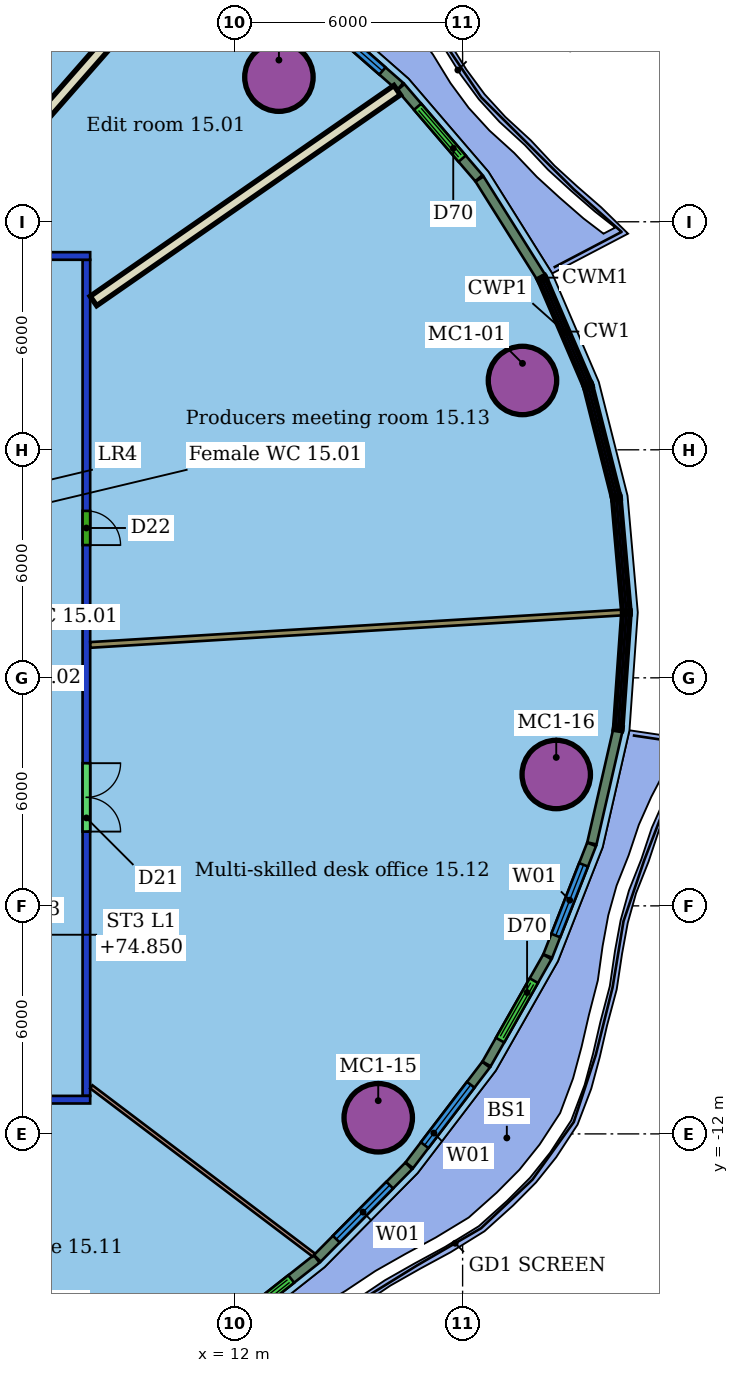
"""IFC4 building model, lengths in metres.
Left out: names, types, materials, properties, quantities, classifications, styles, units other than length and angle.
Written with IfcOpenShell. Run it as: python <this file> out.ifc"""

import sys

from ifc_helpers import new_model, si_unit, direction, frame, frame_2d, origin, origin_2d, place, context, subcontext, project, spatial, rectangle, hollow_circle, extrude, element, fill, save


model = new_model("IFC4")
c1 = context("Model", 3, precision=1e-05, world=origin(), true_north=direction((0.0, 1.0)))
c2 = subcontext(c1, "Body", "Model", "MODEL_VIEW")
j1 = project(units=[si_unit("LENGTHUNIT", "METRE"), si_unit("PLANEANGLEUNIT", "RADIAN")], contexts=[c1])
p1 = place(None, origin())
s1 = spatial("IfcSite", under=j1, at=p1, CompositionType="ELEMENT")
p2 = place(p1, origin())
s2 = spatial("IfcBuilding", under=s1, at=p2, CompositionType="ELEMENT")
p3 = place(p2, frame((0.0, 0.0, 73.0)))
s3 = spatial("IfcBuildingStorey", under=s2, at=p3, CompositionType="ELEMENT", Elevation=73.0)
for number, where, z_axis, x_axis in (
    (1, (19.575, 7.824, 0.0), (0.0, 0.0, 1.0), (1.0, 0.0, 0.0)),
    (2, (13.166, 15.805, 0.0), (0.0, 0.0, 1.0), (1.0, 0.0, 0.0)),
    (3, (15.78, -11.576, 0.0), (0.0, 0.0, 1.0), (1.0, 0.0, 0.0)),
    (4, (20.464, -2.543, 0.0), (0.0, 0.0, 1.0), (1.0, 0.0, 0.0)),
):
    element("IfcColumn", number, at=place(p3, frame(where, z_axis=z_axis, x_axis=x_axis)), inside=s3, PredefinedType="COLUMN", context=c2, shape_type="SweptSolid", body=[
        extrude(hollow_circle(Radius=0.9, WallThickness=0.06, at=origin_2d()), origin(), (0.0, 0.0, 1.0), 3.55),
    ])
p4 = place(p3, frame((8.2, -11.1, 0.0), z_axis=(0.0, 0.0, 1.0), x_axis=(-1.0, 0.0, 0.0)))
e5 = element("IfcWall", 5, at=p4, inside=s3, PredefinedType="PARTITIONING", context=c2, shape_type="SweptSolid", body=[
    extrude(rectangle(XDim=28.4, YDim=0.2, at=frame_2d((14.2, 0.0))), origin(), (0.0, 0.0, 1.0), 2.85),
])
p5 = place(p4, frame((23.619, 0.0, 0.0)))
e6 = element("IfcOpeningElement", 6, at=p5, cuts=e5, PredefinedType="OPENING", context=c2, shape_type="SweptSolid", body=[
    extrude(rectangle(XDim=0.9, YDim=2.1, at=frame_2d((0.45, 1.05))), frame((0.0, 0.11, 0.0), z_axis=(0.0, -1.0, 0.0), x_axis=(1.0, 0.0, 0.0)), (0.0, 0.0, 1.0), 0.22),
])
p6 = place(p4, frame((18.435, 0.0, 0.0)))
e7 = element("IfcOpeningElement", 7, at=p6, cuts=e5, PredefinedType="OPENING", context=c2, shape_type="SweptSolid", body=[
    extrude(rectangle(XDim=1.1, YDim=2.1, at=frame_2d((0.55, 1.05))), frame((0.0, 0.11, 0.0), z_axis=(0.0, -1.0, 0.0), x_axis=(1.0, 0.0, 0.0)), (0.0, 0.0, 1.0), 0.22),
])
p7 = place(p4, frame((9.94, 0.0, 0.0)))
e8 = element("IfcOpeningElement", 8, at=p7, cuts=e5, PredefinedType="OPENING", context=c2, shape_type="SweptSolid", body=[
    extrude(rectangle(XDim=1.0, YDim=2.1, at=frame_2d((0.5, 1.05))), frame((0.0, 0.11, 0.0), z_axis=(0.0, -1.0, 0.0), x_axis=(1.0, 0.0, 0.0)), (0.0, 0.0, 1.0), 0.22),
])
p8 = place(p4, frame((4.945, 0.0, 0.0)))
e9 = element("IfcOpeningElement", 9, at=p8, cuts=e5, PredefinedType="OPENING", context=c2, shape_type="SweptSolid", body=[
    extrude(rectangle(XDim=1.0, YDim=2.1, at=frame_2d((0.5, 1.05))), frame((0.0, 0.11, 0.0), z_axis=(0.0, -1.0, 0.0), x_axis=(1.0, 0.0, 0.0)), (0.0, 0.0, 1.0), 0.22),
])
p9 = place(p3, frame((-20.2, 11.1, 0.0), z_axis=(0.0, 0.0, 1.0), x_axis=(1.0, 0.0, 0.0)))
e10 = element("IfcWall", 10, at=p9, inside=s3, PredefinedType="PARTITIONING", context=c2, shape_type="SweptSolid", body=[
    extrude(rectangle(XDim=28.4, YDim=0.2, at=frame_2d((14.2, 0.0))), origin(), (0.0, 0.0, 1.0), 2.85),
])
p10 = place(p9, frame((25.176, 0.0, 0.0)))
e11 = element("IfcOpeningElement", 11, at=p10, cuts=e10, PredefinedType="OPENING", context=c2, shape_type="SweptSolid", body=[
    extrude(rectangle(XDim=1.2, YDim=2.1, at=frame_2d((0.6, 1.05))), frame((0.0, 0.11, 0.0), z_axis=(0.0, -1.0, 0.0), x_axis=(1.0, 0.0, 0.0)), (0.0, 0.0, 1.0), 0.22),
])
p11 = place(p9, frame((19.498, 0.0, 0.0)))
e12 = element("IfcOpeningElement", 12, at=p11, cuts=e10, PredefinedType="OPENING", context=c2, shape_type="SweptSolid", body=[
    extrude(rectangle(XDim=1.0, YDim=2.1, at=frame_2d((0.5, 1.05))), frame((0.0, 0.11, 0.0), z_axis=(0.0, -1.0, 0.0), x_axis=(1.0, 0.0, 0.0)), (0.0, 0.0, 1.0), 0.22),
])
p12 = place(p9, frame((15.796, 0.0, 0.0)))
e13 = element("IfcOpeningElement", 13, at=p12, cuts=e10, PredefinedType="OPENING", context=c2, shape_type="SweptSolid", body=[
    extrude(rectangle(XDim=0.9, YDim=2.1, at=frame_2d((0.45, 1.05))), frame((0.0, 0.11, 0.0), z_axis=(0.0, -1.0, 0.0), x_axis=(1.0, 0.0, 0.0)), (0.0, 0.0, 1.0), 0.22),
])
p13 = place(p9, frame((9.82, 0.0, 0.0)))
e14 = element("IfcOpeningElement", 14, at=p13, cuts=e10, PredefinedType="OPENING", context=c2, shape_type="SweptSolid", body=[
    extrude(rectangle(XDim=1.1, YDim=2.1, at=frame_2d((0.55, 1.05))), frame((0.0, 0.11, 0.0), z_axis=(0.0, -1.0, 0.0), x_axis=(1.0, 0.0, 0.0)), (0.0, 0.0, 1.0), 0.22),
])
p14 = place(p3, frame((8.1, 11.0, 0.0), z_axis=(0.0, 0.0, 1.0), x_axis=(0.0, -1.0, 0.0)))
e15 = element("IfcWall", 15, at=p14, inside=s3, PredefinedType="PARTITIONING", context=c2, shape_type="SweptSolid", body=[
    extrude(rectangle(XDim=22.0, YDim=0.2, at=frame_2d((11.0, 0.0))), origin(), (0.0, 0.0, 1.0), 2.85),
])
p15 = place(p14, frame((13.246, 0.0, 0.0)))
e16 = element("IfcOpeningElement", 16, at=p15, cuts=e15, PredefinedType="OPENING", context=c2, shape_type="SweptSolid", body=[
    extrude(rectangle(XDim=1.8, YDim=2.1, at=frame_2d((0.9, 1.05))), frame((0.0, 0.11, 0.0), z_axis=(0.0, -1.0, 0.0), x_axis=(1.0, 0.0, 0.0)), (0.0, 0.0, 1.0), 0.22),
])
p16 = place(p14, frame((6.607, 0.0, 0.0)))
e17 = element("IfcOpeningElement", 17, at=p16, cuts=e15, PredefinedType="OPENING", context=c2, shape_type="SweptSolid", body=[
    extrude(rectangle(XDim=0.9, YDim=2.1, at=frame_2d((0.45, 1.05))), frame((0.0, 0.11, 0.0), z_axis=(0.0, -1.0, 0.0), x_axis=(1.0, 0.0, 0.0)), (0.0, 0.0, 1.0), 0.22),
])
p17 = place(p3, frame((16.277, 15.463, 0.0), z_axis=(0.0, 0.0, 1.0), x_axis=(-0.821490466396, -0.57022224932, 0.0)))
e18 = element("IfcWall", 18, at=p17, inside=s3, PredefinedType="PARTITIONING", context=c2, shape_type="SweptSolid", body=[
    extrude(rectangle(XDim=9.728, YDim=0.3, at=frame_2d((4.864, 0.0))), origin(), (0.0, 0.0, 1.0), 3.55),
])
p18 = place(p3, frame((11.051, 19.441, 0.0), z_axis=(0.0, 0.0, 1.0), x_axis=(-0.659383505789, -0.75180675196, 0.0)))
e19 = element("IfcWall", 19, at=p18, inside=s3, PredefinedType="PARTITIONING", context=c2, shape_type="SweptSolid", body=[
    extrude(rectangle(XDim=10.83, YDim=0.3, at=frame_2d((5.415, 0.0))), origin(), (0.0, 0.0, 1.0), 3.55),
])
p19 = place(p3, frame((14.085, -15.189, 0.0), z_axis=(0.0, 0.0, 1.0), x_axis=(-0.797607036042, 0.603177433311, 0.0)))
e20 = element("IfcWall", 20, at=p19, inside=s3, PredefinedType="PARTITIONING", context=c2, shape_type="SweptSolid", body=[
    extrude(rectangle(XDim=7.341, YDim=0.1, at=frame_2d((3.67, 0.0))), origin(), (0.0, 0.0, 1.0), 3.55),
])
p20 = place(p3, frame((22.185, 1.718, 0.0), z_axis=(0.0, 0.0, 1.0), x_axis=(-0.998148956611, -0.060816612989, 0.0)))
e21 = element("IfcWall", 21, at=p20, inside=s3, PredefinedType="PARTITIONING", context=c2, shape_type="SweptSolid", body=[
    extrude(rectangle(XDim=14.006, YDim=0.15, at=frame_2d((7.003, 0.0))), origin(), (0.0, 0.0, 1.0), 3.55),
])
p21 = place(p3, frame((20.062, 10.548, 0.0), z_axis=(0.0, 0.0, 1.0), x_axis=(-0.531461731017, 0.847082303241, 0.0)))
e22 = element("IfcWall", 22, at=p21, inside=s3, PredefinedType="SOLIDWALL", context=c2, shape_type="SweptSolid", body=[
    extrude(rectangle(XDim=3.044, YDim=0.25, at=frame_2d((1.522, 0.0))), origin(), (0.0, 0.0, 1.0), 3.15),
])
p22 = place(p3, frame((18.429, 13.147, 0.0), z_axis=(0.0, 0.0, 1.0), x_axis=(-0.651320140898, 0.75880305354, 0.0)))
e23 = element("IfcWall", 23, at=p22, inside=s3, PredefinedType="SOLIDWALL", context=c2, shape_type="SweptSolid", body=[
    extrude(rectangle(XDim=3.155, YDim=0.25, at=frame_2d((1.578, 0.0))), origin(), (0.0, 0.0, 1.0), 3.15),
])
p23 = place(p22, frame((0.677, 0.0, 0.0)))
e24 = element("IfcOpeningElement", 24, at=p23, cuts=e23, PredefinedType="OPENING", context=c2, shape_type="SweptSolid", body=[
    extrude(rectangle(XDim=1.8, YDim=2.4, at=frame_2d((0.9, 1.2))), frame((0.0, 0.135, 0.0), z_axis=(0.0, -1.0, 0.0), x_axis=(1.0, 0.0, 0.0)), (0.0, 0.0, 1.0), 0.27),
])
p24 = place(p3, frame((16.356, 15.56, 0.0), z_axis=(0.0, 0.0, 1.0), x_axis=(-0.752375826342, 0.658734101088, 0.0)))
e25 = element("IfcWall", 25, at=p24, inside=s3, PredefinedType="SOLIDWALL", context=c2, shape_type="SweptSolid", body=[
    extrude(rectangle(XDim=3.238, YDim=0.25, at=frame_2d((1.619, 0.0))), origin(), (0.0, 0.0, 1.0), 3.15),
])
p25 = place(p24, frame((0.619, 0.0, 0.8)))
e26 = element("IfcOpeningElement", 26, at=p25, cuts=e25, PredefinedType="OPENING", context=c2, shape_type="SweptSolid", body=[
    extrude(rectangle(XDim=2.0, YDim=2.2, at=frame_2d((1.0, 1.1))), frame((0.0, 0.135, 0.0), z_axis=(0.0, -1.0, 0.0), x_axis=(1.0, 0.0, 0.0)), (0.0, 0.0, 1.0), 0.27),
])
p26 = place(p3, frame((11.408, -17.462, 0.0), z_axis=(0.0, 0.0, 1.0), x_axis=(0.784747250061, 0.619815902928, 0.0)))
e27 = element("IfcWall", 27, at=p26, inside=s3, PredefinedType="SOLIDWALL", context=c2, shape_type="SweptSolid", body=[
    extrude(rectangle(XDim=3.505, YDim=0.25, at=frame_2d((1.752, 0.0))), origin(), (0.0, 0.0, 1.0), 3.15),
])
p27 = place(p26, frame((0.853, 0.0, 0.0)))
e28 = element("IfcOpeningElement", 28, at=p27, cuts=e27, PredefinedType="OPENING", context=c2, shape_type="SweptSolid", body=[
    extrude(rectangle(XDim=1.8, YDim=2.4, at=frame_2d((0.9, 1.2))), frame((0.0, 0.135, 0.0), z_axis=(0.0, -1.0, 0.0), x_axis=(1.0, 0.0, 0.0)), (0.0, 0.0, 1.0), 0.27),
])
p28 = place(p3, frame((14.177, -15.274, 0.0), z_axis=(0.0, 0.0, 1.0), x_axis=(0.703348795403, 0.710844900105, 0.0)))
e29 = element("IfcWall", 29, at=p28, inside=s3, PredefinedType="SOLIDWALL", context=c2, shape_type="SweptSolid", body=[
    extrude(rectangle(XDim=3.42, YDim=0.25, at=frame_2d((1.71, 0.0))), origin(), (0.0, 0.0, 1.0), 3.15),
])
p29 = place(p28, frame((0.71, 0.0, 0.8)))
e30 = element("IfcOpeningElement", 30, at=p29, cuts=e29, PredefinedType="OPENING", context=c2, shape_type="SweptSolid", body=[
    extrude(rectangle(XDim=2.0, YDim=2.2, at=frame_2d((1.0, 1.1))), frame((0.0, 0.135, 0.0), z_axis=(0.0, -1.0, 0.0), x_axis=(1.0, 0.0, 0.0)), (0.0, 0.0, 1.0), 0.27),
])
p30 = place(p3, frame((16.598, -12.825, 0.0), z_axis=(0.0, 0.0, 1.0), x_axis=(0.606551340404, 0.795044320433, 0.0)))
e31 = element("IfcWall", 31, at=p30, inside=s3, PredefinedType="SOLIDWALL", context=c2, shape_type="SweptSolid", body=[
    extrude(rectangle(XDim=3.329, YDim=0.25, at=frame_2d((1.664, 0.0))), origin(), (0.0, 0.0, 1.0), 3.15),
])
p31 = place(p30, frame((0.664, 0.0, 0.8)))
e32 = element("IfcOpeningElement", 32, at=p31, cuts=e31, PredefinedType="OPENING", context=c2, shape_type="SweptSolid", body=[
    extrude(rectangle(XDim=2.0, YDim=2.2, at=frame_2d((1.0, 1.1))), frame((0.0, 0.135, 0.0), z_axis=(0.0, -1.0, 0.0), x_axis=(1.0, 0.0, 0.0)), (0.0, 0.0, 1.0), 0.27),
])
p32 = place(p3, frame((18.63, -10.158, 0.0), z_axis=(0.0, 0.0, 1.0), x_axis=(0.49387210609, 0.86953455528, 0.0)))
e33 = element("IfcWall", 33, at=p32, inside=s3, PredefinedType="SOLIDWALL", context=c2, shape_type="SweptSolid", body=[
    extrude(rectangle(XDim=3.239, YDim=0.25, at=frame_2d((1.619, 0.0))), origin(), (0.0, 0.0, 1.0), 3.15),
])
p33 = place(p32, frame((0.719, 0.0, 0.0)))
e34 = element("IfcOpeningElement", 34, at=p33, cuts=e33, PredefinedType="OPENING", context=c2, shape_type="SweptSolid", body=[
    extrude(rectangle(XDim=1.8, YDim=2.4, at=frame_2d((0.9, 1.2))), frame((0.0, 0.135, 0.0), z_axis=(0.0, -1.0, 0.0), x_axis=(1.0, 0.0, 0.0)), (0.0, 0.0, 1.0), 0.27),
])
p34 = place(p3, frame((20.241, -7.319, 0.0), z_axis=(0.0, 0.0, 1.0), x_axis=(0.365472806346, 0.930822017263, 0.0)))
e35 = element("IfcWall", 35, at=p34, inside=s3, PredefinedType="SOLIDWALL", context=c2, shape_type="SweptSolid", body=[
    extrude(rectangle(XDim=3.155, YDim=0.25, at=frame_2d((1.578, 0.0))), origin(), (0.0, 0.0, 1.0), 3.15),
])
p35 = place(p34, frame((0.577, 0.0, 0.8)))
e36 = element("IfcOpeningElement", 36, at=p35, cuts=e35, PredefinedType="OPENING", context=c2, shape_type="SweptSolid", body=[
    extrude(rectangle(XDim=2.0, YDim=2.2, at=frame_2d((1.0, 1.1))), frame((0.0, 0.135, 0.0), z_axis=(0.0, -1.0, 0.0), x_axis=(1.0, 0.0, 0.0)), (0.0, 0.0, 1.0), 0.27),
])
p36 = place(p3, frame((21.402, -4.357, 0.0), z_axis=(0.0, 0.0, 1.0), x_axis=(0.223295188231, 0.974750870178, 0.0)))
e37 = element("IfcWall", 37, at=p36, inside=s3, PredefinedType="SOLIDWALL", context=c2, shape_type="SweptSolid", body=[
    extrude(rectangle(XDim=3.044, YDim=0.25, at=frame_2d((1.522, 0.0))), origin(), (0.0, 0.0, 1.0), 3.15),
])
p37 = place(p15, origin())
e38 = element("IfcDoor", 38, at=p37, inside=s3, OperationType="DOUBLE_DOOR_SINGLE_SWING", PredefinedType="DOOR", context=c2, shape_type="SweptSolid", body=[
    extrude(rectangle(XDim=1.8, YDim=2.1, at=frame_2d((0.9, 1.05))), frame((0.0, 0.025, 0.0), z_axis=(0.0, -1.0, 0.0), x_axis=(1.0, 0.0, 0.0)), (0.0, 0.0, 1.0), 0.05),
])
fill(e16, e38)
p38 = place(p16, origin())
e39 = element("IfcDoor", 39, at=p38, inside=s3, OperationType="SINGLE_SWING_RIGHT", PredefinedType="DOOR", context=c2, shape_type="SweptSolid", body=[
    extrude(rectangle(XDim=0.9, YDim=2.1, at=frame_2d((0.45, 1.05))), frame((0.0, 0.025, 0.0), z_axis=(0.0, -1.0, 0.0), x_axis=(1.0, 0.0, 0.0)), (0.0, 0.0, 1.0), 0.05),
])
fill(e17, e39)
p39 = place(p23, origin())
e40 = element("IfcDoor", 40, at=p39, inside=s3, OperationType="DOUBLE_DOOR_SLIDING", PredefinedType="DOOR", context=c2, shape_type="SweptSolid", body=[
    extrude(rectangle(XDim=1.8, YDim=2.4, at=frame_2d((0.9, 1.2))), frame((0.0, 0.025, 0.0), z_axis=(0.0, -1.0, 0.0), x_axis=(1.0, 0.0, 0.0)), (0.0, 0.0, 1.0), 0.05),
])
fill(e24, e40)
p40 = place(p25, origin())
e41 = element("IfcWindow", 41, at=p40, inside=s3, PartitioningType="SINGLE_PANEL", PredefinedType="WINDOW", context=c2, shape_type="SweptSolid", body=[
    extrude(rectangle(XDim=2.0, YDim=2.2, at=frame_2d((1.0, 1.1))), frame((0.0, 0.03, 0.0), z_axis=(0.0, -1.0, 0.0), x_axis=(1.0, 0.0, 0.0)), (0.0, 0.0, 1.0), 0.06),
])
fill(e26, e41)
p41 = place(p27, origin())
e42 = element("IfcDoor", 42, at=p41, inside=s3, OperationType="DOUBLE_DOOR_SLIDING", PredefinedType="DOOR", context=c2, shape_type="SweptSolid", body=[
    extrude(rectangle(XDim=1.8, YDim=2.4, at=frame_2d((0.9, 1.2))), frame((0.0, 0.025, 0.0), z_axis=(0.0, -1.0, 0.0), x_axis=(1.0, 0.0, 0.0)), (0.0, 0.0, 1.0), 0.05),
])
fill(e28, e42)
p42 = place(p29, origin())
e43 = element("IfcWindow", 43, at=p42, inside=s3, PartitioningType="SINGLE_PANEL", PredefinedType="WINDOW", context=c2, shape_type="SweptSolid", body=[
    extrude(rectangle(XDim=2.0, YDim=2.2, at=frame_2d((1.0, 1.1))), frame((0.0, 0.03, 0.0), z_axis=(0.0, -1.0, 0.0), x_axis=(1.0, 0.0, 0.0)), (0.0, 0.0, 1.0), 0.06),
])
fill(e30, e43)
p43 = place(p31, origin())
e44 = element("IfcWindow", 44, at=p43, inside=s3, PartitioningType="SINGLE_PANEL", PredefinedType="WINDOW", context=c2, shape_type="SweptSolid", body=[
    extrude(rectangle(XDim=2.0, YDim=2.2, at=frame_2d((1.0, 1.1))), frame((0.0, 0.03, 0.0), z_axis=(0.0, -1.0, 0.0), x_axis=(1.0, 0.0, 0.0)), (0.0, 0.0, 1.0), 0.06),
])
fill(e32, e44)
p44 = place(p33, origin())
e45 = element("IfcDoor", 45, at=p44, inside=s3, OperationType="DOUBLE_DOOR_SLIDING", PredefinedType="DOOR", context=c2, shape_type="SweptSolid", body=[
    extrude(rectangle(XDim=1.8, YDim=2.4, at=frame_2d((0.9, 1.2))), frame((0.0, 0.025, 0.0), z_axis=(0.0, -1.0, 0.0), x_axis=(1.0, 0.0, 0.0)), (0.0, 0.0, 1.0), 0.05),
])
fill(e34, e45)
p45 = place(p35, origin())
e46 = element("IfcWindow", 46, at=p45, inside=s3, PartitioningType="SINGLE_PANEL", PredefinedType="WINDOW", context=c2, shape_type="SweptSolid", body=[
    extrude(rectangle(XDim=2.0, YDim=2.2, at=frame_2d((1.0, 1.1))), frame((0.0, 0.03, 0.0), z_axis=(0.0, -1.0, 0.0), x_axis=(1.0, 0.0, 0.0)), (0.0, 0.0, 1.0), 0.06),
])
fill(e36, e46)
save(model, sys.argv[1])
